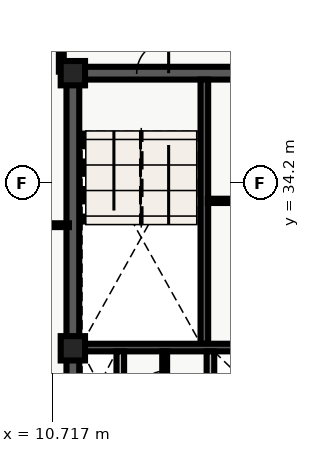
"""IFC4 building model, lengths in metres.
Left out: names, types, materials, properties, quantities, classifications, styles, units other than length and angle.
Written with IfcOpenShell. Run it as: python <this file> out.ifc"""

import sys

from ifc_helpers import new_model, entity, si_unit, converted_unit, direction, frame, origin_with_axes, origin_2d_with_axis, place, context, subcontext, project, spatial, polyline, rectangle, outline, extrude, element, fill, save


model = new_model("IFC4")
c1 = context("Model", 3, precision=1e-05, world=origin_with_axes(), true_north=direction((0.0, 1.0)))
c2 = subcontext(c1, "Body", "Model", "MODEL_VIEW")
j1 = project(units=[si_unit("LENGTHUNIT", "METRE"), converted_unit("PLANEANGLEUNIT", "DEGREE", entity("IfcPlaneAngleMeasure", 0.017), si_unit("PLANEANGLEUNIT", "RADIAN"), dimensions=[0, 0, 0, 0, 0, 0, 0])], contexts=[c1])
p1 = place(None, origin_with_axes())
s1 = spatial("IfcSite", under=j1, at=p1, CompositionType="ELEMENT")
p2 = place(p1, origin_with_axes())
s2 = spatial("IfcBuilding", under=s1, at=p2, CompositionType="ELEMENT")
p3 = place(p2, frame((0.0, 0.0, 284.1), z_axis=(0.0, 0.0, 1.0), x_axis=(1.0, 0.0, 0.0)))
s3 = spatial("IfcBuildingStorey", under=s2, at=p3, CompositionType="ELEMENT", Elevation=284.1)
p4 = place(p3, frame((11.4, 10.8, 0.0), z_axis=(0.0, 0.0, 1.0), x_axis=(0.0, 1.0, 0.0)))
e1 = element("IfcWall", 1, at=p4, inside=s3, PredefinedType="SHEAR", context=c2, shape_type="SweptSolid", body=[
    extrude(outline(polyline([(0.0, -0.21), (27.0, -0.21), (27.0, 0.21), (0.0, 0.21), (0.0, -0.21)])), origin_with_axes(), (0.0, 0.0, 1.0), 3.6),
])
p5 = place(p3, frame((11.4, 37.8, 0.0), z_axis=(0.0, 0.0, 1.0), x_axis=(1.0, 0.0, 0.0)))
e2 = element("IfcWall", 2, at=p5, inside=s3, PredefinedType="SHEAR", context=c2, shape_type="SweptSolid", body=[
    extrude(outline(polyline([(0.0, -0.21), (7.2, -0.21), (7.2, 0.21), (0.0, 0.21), (0.0, -0.21)])), origin_with_axes(), (0.0, 0.0, 1.0), 3.6),
])
p6 = place(p5, frame((2.625, 0.0, 0.0), z_axis=(0.0, 0.0, 1.0), x_axis=(1.0, 0.0, 0.0)))
e3 = element("IfcOpeningElement", 3, at=p6, cuts=e2, PredefinedType="OPENING", context=c2, shape_type="SweptSolid", body=[
    extrude(rectangle(XDim=1.05, YDim=0.44, at=origin_2d_with_axis()), origin_with_axes(), (0.0, 0.0, 1.0), 2.15),
])
p7 = place(p3, frame((15.725, 28.9, 0.0), z_axis=(0.0, 0.0, 1.0), x_axis=(0.0, 1.0, 0.0)))
e4 = element("IfcWall", 4, at=p7, inside=s3, PredefinedType="SHEAR", context=c2, shape_type="SweptSolid", body=[
    extrude(outline(polyline([(0.0, -0.125), (8.69, -0.125), (8.69, 0.125), (0.0, 0.125), (0.0, -0.125)])), origin_with_axes(), (0.0, 0.0, 1.0), 3.6),
])
p8 = place(p3, frame((11.61, 28.775, 0.0), z_axis=(0.0, 0.0, 1.0), x_axis=(1.0, 0.0, 0.0)))
e5 = element("IfcWall", 5, at=p8, inside=s3, PredefinedType="SHEAR", context=c2, shape_type="SweptSolid", body=[
    extrude(outline(polyline([(0.0, -0.125), (6.78, -0.125), (6.78, 0.125), (0.0, 0.125), (0.0, -0.125)])), origin_with_axes(), (0.0, 0.0, 1.0), 3.6),
])
for number, where, z_axis, x_axis in (
    (6, (12.96, 26.45, 0.0), (0.0, 0.0, 1.0), (0.0, 1.0, 0.0)),
    (7, (15.925, 26.45, 0.0), (0.0, 0.0, 1.0), (0.0, 1.0, 0.0)),
):
    element("IfcWall", number, at=place(p3, frame(where, z_axis=z_axis, x_axis=x_axis)), inside=s3, PredefinedType="SOLIDWALL", context=c2, shape_type="SweptSolid", body=[
        extrude(outline(polyline([(0.0, -0.125), (2.2, -0.125), (2.2, 0.125), (0.0, 0.125), (0.0, -0.125)])), origin_with_axes(), (0.0, 0.0, 1.0), 2.64),
    ])
for number, where, z_axis, x_axis in (
    (8, (11.4, 28.75, 0.0), (0.0, 0.0, 1.0), (1.0, 0.0, 0.0)),
    (9, (11.4, 37.8, 0.0), (0.0, 0.0, 1.0), (1.0, 0.0, 0.0)),
):
    element("IfcColumn", number, at=place(p3, frame(where, z_axis=z_axis, x_axis=x_axis)), inside=s3, PredefinedType="COLUMN", context=c2, shape_type="SweptSolid", body=[
        extrude(rectangle(XDim=0.8, YDim=0.8, at=origin_2d_with_axis()), origin_with_axes(), (0.0, 0.0, 1.0), 3.9),
    ])
p9 = place(p3, frame((14.42, 26.45, 0.0), z_axis=(0.0, 0.0, 1.0), x_axis=(0.0, 1.0, 0.0)))
e10 = element("IfcWall", 10, at=p9, inside=s3, PredefinedType="PARTITIONING", context=c2, shape_type="SweptSolid", body=[
    extrude(outline(polyline([(0.0, -0.08), (2.2, -0.08), (2.2, 0.08), (0.0, 0.08), (0.0, -0.08)])), origin_with_axes(), (0.0, 0.0, 1.0), 2.64),
])
p10 = place(p9, frame((1.1, 0.0, 0.0), z_axis=(0.0, 0.0, 1.0), x_axis=(1.0, 0.0, 0.0)))
e11 = element("IfcOpeningElement", 11, at=p10, cuts=e10, PredefinedType="OPENING", context=c2, shape_type="SweptSolid", body=[
    extrude(rectangle(XDim=0.9, YDim=0.18, at=origin_2d_with_axis()), origin_with_axes(), (0.0, 0.0, 1.0), 2.15),
])
p11 = place(p3, frame((15.84, 33.6, 0.0), z_axis=(0.0, 0.0, 1.0), x_axis=(1.0, 0.0, 0.0)))
e12 = element("IfcWall", 12, at=p11, inside=s3, PredefinedType="PARTITIONING", context=c2, shape_type="SweptSolid", body=[
    extrude(outline(polyline([(0.0, -0.07), (2.46, -0.07), (2.46, 0.07), (0.0, 0.07), (0.0, -0.07)])), origin_with_axes(), (0.0, 0.0, 1.0), 2.64),
])
p12 = place(p3, frame((11.02, 37.85, 0.0), z_axis=(0.0, 0.0, 1.0), x_axis=(0.0, 1.0, 0.0)))
e13 = element("IfcWall", 13, at=p12, inside=s3, PredefinedType="PARTITIONING", context=c2, shape_type="SweptSolid", body=[
    extrude(outline(polyline([(0.0, -0.08), (2.65, -0.08), (2.65, 0.08), (0.0, 0.08), (0.0, -0.08)])), origin_with_axes(), (0.0, 0.0, 1.0), 2.64),
])
p13 = place(p12, frame((1.4, 0.0, 0.0), z_axis=(0.0, 0.0, 1.0), x_axis=(1.0, 0.0, 0.0)))
e14 = element("IfcOpeningElement", 14, at=p13, cuts=e13, PredefinedType="OPENING", context=c2, shape_type="SweptSolid", body=[
    extrude(rectangle(XDim=0.9, YDim=0.18, at=origin_2d_with_axis()), origin_with_axes(), (0.0, 0.0, 1.0), 2.15),
])
p14 = place(p3, frame((8.135, 32.8, 0.0), z_axis=(0.0, 0.0, 1.0), x_axis=(1.0, 0.0, 0.0)))
e15 = element("IfcWall", 15, at=p14, inside=s3, PredefinedType="PARTITIONING", context=c2, shape_type="SweptSolid", body=[
    extrude(outline(polyline([(0.0, -0.062), (3.135, -0.062), (3.135, 0.062), (0.0, 0.062), (0.0, -0.062)])), origin_with_axes(), (0.0, 0.0, 1.0), 2.64),
])
p15 = place(p14, frame((1.925, 0.0, 0.0), z_axis=(0.0, 0.0, 1.0), x_axis=(1.0, 0.0, 0.0)))
e16 = element("IfcOpeningElement", 16, at=p15, cuts=e15, PredefinedType="OPENING", context=c2, shape_type="SweptSolid", body=[
    extrude(rectangle(XDim=0.9, YDim=0.145, at=origin_2d_with_axis()), origin_with_axes(), (0.0, 0.0, 1.0), 2.15),
])
p16 = place(p5, frame((2.625, 0.0, 0.0), z_axis=(0.0, 0.0, 1.0), x_axis=(1.0, 0.0, 0.0)))
e17 = element("IfcDoor", 17, at=p16, inside=s3, OperationType="SINGLE_SWING_RIGHT", PredefinedType="DOOR", context=c2, shape_type="SweptSolid", body=[
    extrude(rectangle(XDim=1.05, YDim=0.09, at=origin_2d_with_axis()), origin_with_axes(), (0.0, 0.0, 1.0), 2.15),
])
fill(e3, e17)
p17 = place(p9, frame((1.1, 0.0, 0.0), z_axis=(0.0, 0.0, 1.0), x_axis=(1.0, 0.0, 0.0)))
e18 = element("IfcDoor", 18, at=p17, inside=s3, OperationType="SINGLE_SWING_LEFT", PredefinedType="DOOR", context=c2, shape_type="SweptSolid", body=[
    extrude(rectangle(XDim=0.9, YDim=0.09, at=origin_2d_with_axis()), origin_with_axes(), (0.0, 0.0, 1.0), 2.15),
])
fill(e11, e18)
save(model, sys.argv[1])
